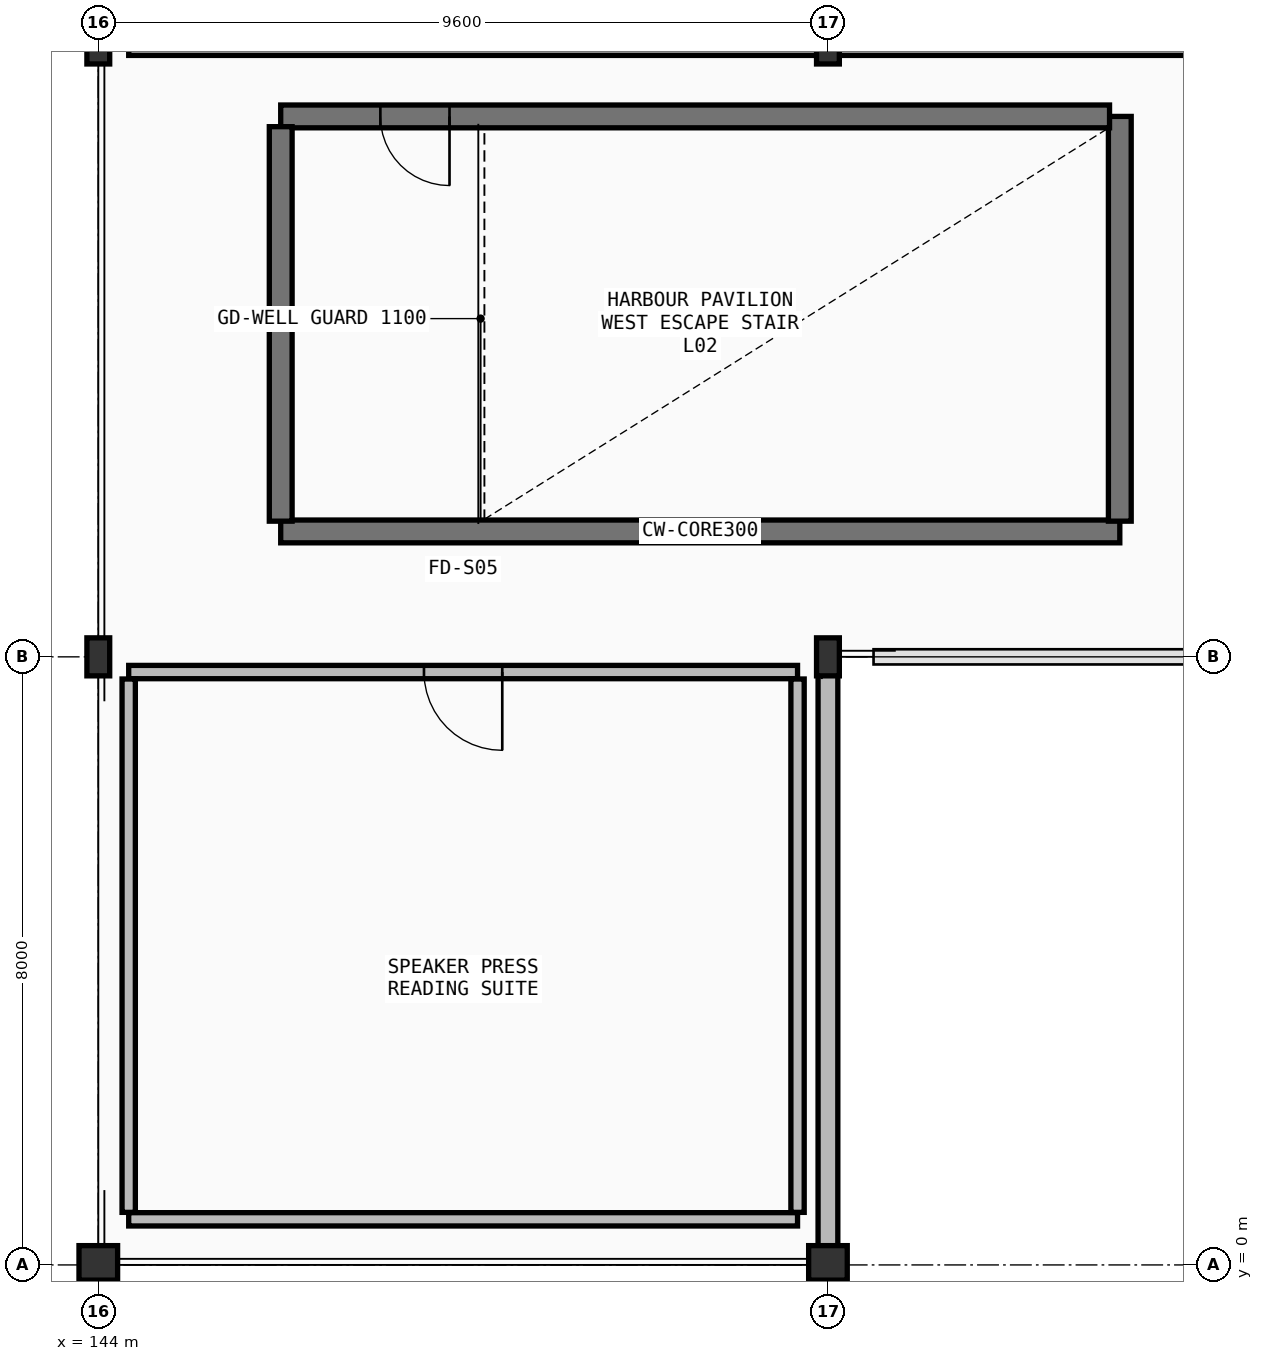
"""IFC4 building model, lengths in metres.
Left out: names, types, materials, properties, quantities, classifications, styles, units other than length and angle.
Written with IfcOpenShell. Run it as: python <this file> out.ifc"""

import sys

from ifc_helpers import new_model, si_unit, direction, frame, frame_2d, origin, origin_2d, place, context, subcontext, project, spatial, rectangle, hollow_circle, i_section, extrude, element, fill, save


model = new_model("IFC4")
c1 = context("Model", 3, precision=1e-05, world=origin(), true_north=direction((0.0, 1.0)))
c2 = subcontext(c1, "Body", "Model", "MODEL_VIEW")
j1 = project(units=[si_unit("LENGTHUNIT", "METRE"), si_unit("PLANEANGLEUNIT", "RADIAN")], contexts=[c1])
p1 = place(None, origin())
s1 = spatial("IfcSite", under=j1, at=p1, CompositionType="ELEMENT")
p2 = place(p1, origin())
s2 = spatial("IfcBuilding", under=s1, at=p2, CompositionType="ELEMENT")
p3 = place(p2, frame((0.0, 0.0, 11.4)))
s3 = spatial("IfcBuildingStorey", under=s2, at=p3, CompositionType="ELEMENT", Elevation=11.4)
p4 = place(p3, frame((144.0, 0.0, 0.0), z_axis=(0.0, 0.0, 1.0), x_axis=(1.0, 0.0, 0.0)))
e1 = element("IfcColumn", 1, at=p4, inside=s3, PredefinedType="COLUMN", context=c2, shape_type="SweptSolid", body=[
    extrude(hollow_circle(Radius=0.254, WallThickness=0.025, at=origin_2d()), origin(), (0.0, 0.0, 1.0), 4.5),
])
p5 = place(p3, frame((144.0, 8.0, 0.0), z_axis=(0.0, 0.0, 1.0), x_axis=(1.0, 0.0, 0.0)))
e2 = element("IfcColumn", 2, at=p5, inside=s3, PredefinedType="COLUMN", context=c2, shape_type="SweptSolid", body=[
    extrude(i_section(OverallWidth=0.3, OverallDepth=0.5, WebThickness=0.014, FlangeThickness=0.028, FilletRadius=0.027, at=origin_2d()), origin(), (0.0, 0.0, 1.0), 4.5),
])
p6 = place(p3, frame((144.0, 16.0, 0.0), z_axis=(0.0, 0.0, 1.0), x_axis=(1.0, 0.0, 0.0)))
e3 = element("IfcColumn", 3, at=p6, inside=s3, PredefinedType="COLUMN", context=c2, shape_type="SweptSolid", body=[
    extrude(i_section(OverallWidth=0.3, OverallDepth=0.4, WebThickness=0.013, FlangeThickness=0.024, FilletRadius=0.027, at=origin_2d()), origin(), (0.0, 0.0, 1.0), 4.5),
])
p7 = place(p3, frame((153.6, 0.0, 0.0), z_axis=(0.0, 0.0, 1.0), x_axis=(1.0, 0.0, 0.0)))
e4 = element("IfcColumn", 4, at=p7, inside=s3, PredefinedType="COLUMN", context=c2, shape_type="SweptSolid", body=[
    extrude(hollow_circle(Radius=0.254, WallThickness=0.025, at=origin_2d()), origin(), (0.0, 0.0, 1.0), 4.5),
])
p8 = place(p3, frame((153.6, 8.0, 0.0), z_axis=(0.0, 0.0, 1.0), x_axis=(1.0, 0.0, 0.0)))
e5 = element("IfcColumn", 5, at=p8, inside=s3, PredefinedType="COLUMN", context=c2, shape_type="SweptSolid", body=[
    extrude(i_section(OverallWidth=0.3, OverallDepth=0.5, WebThickness=0.014, FlangeThickness=0.028, FilletRadius=0.027, at=origin_2d()), origin(), (0.0, 0.0, 1.0), 4.5),
])
p9 = place(p3, frame((153.6, 16.0, 0.0), z_axis=(0.0, 0.0, 1.0), x_axis=(1.0, 0.0, 0.0)))
e6 = element("IfcColumn", 6, at=p9, inside=s3, PredefinedType="COLUMN", context=c2, shape_type="SweptSolid", body=[
    extrude(i_section(OverallWidth=0.3, OverallDepth=0.4, WebThickness=0.013, FlangeThickness=0.024, FilletRadius=0.027, at=origin_2d()), origin(), (0.0, 0.0, 1.0), 4.5),
])
p10 = place(p3, frame((153.6, 0.0, 0.0), z_axis=(0.0, 0.0, 1.0), x_axis=(0.0, 1.0, 0.0)))
e7 = element("IfcWall", 7, at=p10, inside=s3, PredefinedType="STANDARD", context=c2, shape_type="SweptSolid", body=[
    extrude(rectangle(XDim=8.0, YDim=0.26, at=frame_2d((4.0, 0.0))), origin(), (0.0, 0.0, 1.0), 3.594),
])
p11 = place(p3, frame((146.4, 9.65, 0.0), z_axis=(0.0, 0.0, 1.0), x_axis=(1.0, 0.0, 0.0)))
e8 = element("IfcWall", 8, at=p11, inside=s3, PredefinedType="SHEAR", context=c2, shape_type="SweptSolid", body=[
    extrude(rectangle(XDim=11.04, YDim=0.3, at=frame_2d((5.52, 0.0))), origin(), (0.0, 0.0, 1.0), 4.274),
])
p12 = place(p3, frame((157.44, 9.785, 0.0), z_axis=(0.0, 0.0, 1.0), x_axis=(0.0, 1.0, 0.0)))
e9 = element("IfcWall", 9, at=p12, inside=s3, PredefinedType="SHEAR", context=c2, shape_type="SweptSolid", body=[
    extrude(rectangle(XDim=5.325, YDim=0.3, at=frame_2d((2.663, 0.0))), origin(), (0.0, 0.0, 1.0), 4.276),
])
p13 = place(p3, frame((157.305, 15.11, 0.0), z_axis=(0.0, 0.0, 1.0), x_axis=(-1.0, 0.0, 0.0)))
e10 = element("IfcWall", 10, at=p13, inside=s3, PredefinedType="SHEAR", context=c2, shape_type="SweptSolid", body=[
    extrude(rectangle(XDim=10.905, YDim=0.3, at=frame_2d((5.453, 0.0))), origin(), (0.0, 0.0, 1.0), 4.274),
])
p14 = place(p13, frame((8.684, 0.0, 0.0)))
e11 = element("IfcOpeningElement", 11, at=p14, cuts=e10, PredefinedType="OPENING", context=c2, shape_type="SweptSolid", body=[
    extrude(rectangle(XDim=0.91, YDim=2.08, at=frame_2d((0.455, 1.04))), frame((0.0, 0.16, 0.0), z_axis=(0.0, -1.0, 0.0), x_axis=(1.0, 0.0, 0.0)), (0.0, 0.0, 1.0), 0.32),
])
p15 = place(p3, frame((146.4, 14.975, 0.0), z_axis=(0.0, 0.0, 1.0), x_axis=(0.0, -1.0, 0.0)))
e12 = element("IfcWall", 12, at=p15, inside=s3, PredefinedType="SHEAR", context=c2, shape_type="SweptSolid", body=[
    extrude(rectangle(XDim=5.19, YDim=0.3, at=frame_2d((2.595, 0.0))), origin(), (0.0, 0.0, 1.0), 4.274),
])
p16 = place(p3, frame((144.4, 16.0, 0.0), z_axis=(0.0, 0.0, 1.0), x_axis=(1.0, 0.0, 0.0)))
e13 = element("IfcWall", 13, at=p16, inside=s3, PredefinedType="PARTITIONING", context=c2, shape_type="SweptSolid", body=[
    extrude(rectangle(XDim=37.6, YDim=0.175, at=frame_2d((18.8, 0.0))), origin(), (0.0, 0.0, 1.0), 3.346),
])
p17 = place(p16, frame((14.352, 0.0, 0.0)))
e14 = element("IfcOpeningElement", 14, at=p17, cuts=e13, PredefinedType="OPENING", context=c2, shape_type="SweptSolid", body=[
    extrude(rectangle(XDim=1.72, YDim=2.24, at=frame_2d((0.86, 1.12))), frame((0.0, 0.097, 0.0), z_axis=(0.0, -1.0, 0.0), x_axis=(1.0, 0.0, 0.0)), (0.0, 0.0, 1.0), 0.195),
])
p18 = place(p16, frame((30.378, 0.0, 0.0)))
e15 = element("IfcOpeningElement", 15, at=p18, cuts=e13, PredefinedType="OPENING", context=c2, shape_type="SweptSolid", body=[
    extrude(rectangle(XDim=1.0, YDim=2.12, at=frame_2d((0.5, 1.06))), frame((0.0, 0.097, 0.0), z_axis=(0.0, -1.0, 0.0), x_axis=(1.0, 0.0, 0.0)), (0.0, 0.0, 1.0), 0.195),
])
p19 = place(p3, frame((153.2, 7.8, 0.0), z_axis=(0.0, 0.0, 1.0), x_axis=(-1.0, 0.0, 0.0)))
e16 = element("IfcWall", 16, at=p19, inside=s3, PredefinedType="PARTITIONING", context=c2, shape_type="SweptSolid", body=[
    extrude(rectangle(XDim=8.8, YDim=0.175, at=frame_2d((4.4, 0.0))), origin(), (0.0, 0.0, 1.0), 3.854),
])
p20 = place(p19, frame((3.885, 0.0, 0.0)))
e17 = element("IfcOpeningElement", 17, at=p20, cuts=e16, PredefinedType="OPENING", context=c2, shape_type="SweptSolid", body=[
    extrude(rectangle(XDim=1.03, YDim=2.14, at=frame_2d((0.515, 1.07))), frame((0.0, 0.097, 0.0), z_axis=(0.0, -1.0, 0.0), x_axis=(1.0, 0.0, 0.0)), (0.0, 0.0, 1.0), 0.195),
])
p21 = place(p3, frame((144.4, 0.6, 0.0), z_axis=(0.0, 0.0, 1.0), x_axis=(1.0, 0.0, 0.0)))
e18 = element("IfcWall", 18, at=p21, inside=s3, PredefinedType="PARTITIONING", context=c2, shape_type="SweptSolid", body=[
    extrude(rectangle(XDim=8.8, YDim=0.175, at=frame_2d((4.4, 0.0))), origin(), (0.0, 0.0, 1.0), 4.274),
])
for number, where, z_axis, x_axis in (
    (19, (153.2, 0.691, 0.0), (0.0, 0.0, 1.0), (0.0, 1.0, 0.0)),
    (20, (144.4, 7.708, 0.0), (0.0, 0.0, 1.0), (0.0, -1.0, 0.0)),
):
    element("IfcWall", number, at=place(p3, frame(where, z_axis=z_axis, x_axis=x_axis)), inside=s3, PredefinedType="PARTITIONING", context=c2, shape_type="SweptSolid", body=[
        extrude(rectangle(XDim=7.017, YDim=0.175, at=frame_2d((3.509, 0.0))), origin(), (0.0, 0.0, 1.0), 4.274),
    ])
p22 = place(p14, origin())
e21 = element("IfcDoor", 21, at=p22, inside=s3, OperationType="SINGLE_SWING_LEFT", PredefinedType="DOOR", context=c2, shape_type="SweptSolid", body=[
    extrude(rectangle(XDim=0.91, YDim=2.08, at=frame_2d((0.455, 1.04))), frame((0.0, 0.025, 0.0), z_axis=(0.0, -1.0, 0.0), x_axis=(1.0, 0.0, 0.0)), (0.0, 0.0, 1.0), 0.05),
])
fill(e11, e21)
p23 = place(p20, origin())
e22 = element("IfcDoor", 22, at=p23, inside=s3, OperationType="SINGLE_SWING_RIGHT", PredefinedType="DOOR", context=c2, shape_type="SweptSolid", body=[
    extrude(rectangle(XDim=1.03, YDim=2.14, at=frame_2d((0.515, 1.07))), frame((0.0, 0.025, 0.0), z_axis=(0.0, -1.0, 0.0), x_axis=(1.0, 0.0, 0.0)), (0.0, 0.0, 1.0), 0.05),
])
fill(e17, e22)
save(model, sys.argv[1])
